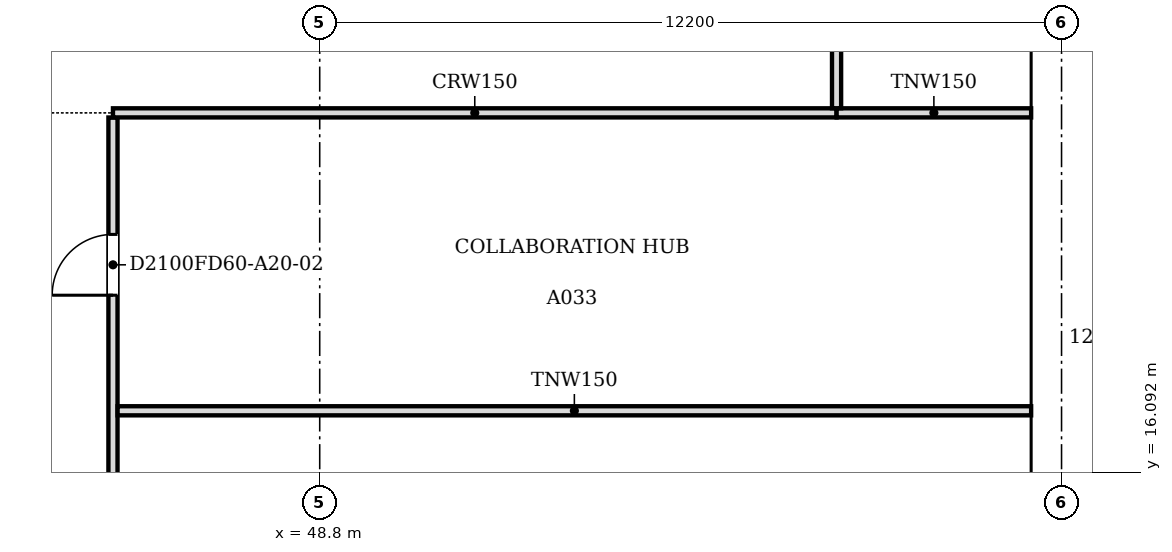
"""IFC4 building model, lengths in metres.
Left out: names, types, materials, properties, quantities, classifications, styles, units other than length and angle.
Written with IfcOpenShell. Run it as: python <this file> out.ifc"""

import sys

from ifc_helpers import new_model, si_unit, direction, frame, frame_2d, origin, place, context, subcontext, project, spatial, polyline, rectangle, outline, extrude, faceted_brep, source, transform, mapped, element, fill, save


model = new_model("IFC4")
c1 = context("Model", 3, precision=1e-05, world=origin(), true_north=direction((0.0, 1.0)))
c2 = subcontext(c1, "Body", "Model", "MODEL_VIEW")
j1 = project(units=[si_unit("LENGTHUNIT", "METRE"), si_unit("PLANEANGLEUNIT", "RADIAN")], contexts=[c1])
p1 = place(None, origin())
s1 = spatial("IfcSite", under=j1, at=p1, CompositionType="ELEMENT")
p2 = place(p1, origin())
s2 = spatial("IfcBuilding", under=s1, at=p2, CompositionType="ELEMENT")
p3 = place(p2, frame((0.0, 0.0, 228.3)))
s3 = spatial("IfcBuildingStorey", under=s2, at=p3, CompositionType="ELEMENT", Elevation=228.3)
m1 = source(origin(), c2, "Body", "SweptSolid", [
    extrude(outline(polyline([(3.05, 0.0), (6.1, 3.8), (3.05, 7.6), (0.0, 3.8), (3.05, 0.0)])), frame((0.0, 0.25, 0.0), z_axis=(0.0, -1.0, 0.0), x_axis=(1.0, 0.0, 0.0)), (0.0, 0.0, 1.0), 0.5),
])
p4 = place(p3, frame((60.75, 12.2, -3.8), z_axis=(0.0, 0.0, 1.0), x_axis=(0.0, 1.0, 0.0)))
e1 = element("IfcWall", 1, at=p4, inside=s3, PredefinedType="SOLIDWALL", context=c2, shape_type="MappedRepresentation", body=[
    mapped(m1, transform((0.0, 0.0, 0.0), scale=1.0)),
])
m2 = source(origin(), c2, "Body", "SweptSolid", [
    extrude(outline(polyline([(3.05, 0.399), (5.78, 3.8), (3.05, 7.201), (0.321, 3.8), (3.05, 0.399)])), frame((0.0, 0.26, 0.0), z_axis=(0.0, -1.0, 0.0), x_axis=(1.0, 0.0, 0.0)), (0.0, 0.0, 1.0), 0.52),
])
p5 = place(p4, origin())
e2 = element("IfcOpeningElement", 2, at=p5, cuts=e1, PredefinedType="OPENING", context=c2, shape_type="MappedRepresentation", body=[
    mapped(m2, transform((0.0, 0.0, 0.0), scale=1.0)),
])
m3 = source(origin(), c2, "Body", "Brep", [
    faceted_brep([(3.05, -0.25, 0.0), (6.1, -0.25, 3.8), (6.1, -0.25, 3.8), (3.05, -0.25, 7.6), (0.0, -0.25, 3.8), (0.0, 0.25, 3.8), (3.05, 0.25, 7.6), (6.1, 0.25, 3.8), (6.1, 0.25, 3.8), (3.05, 0.25, 0.0)], [[[0, 1, 2, 3, 4]], [[5, 6, 7, 8, 9]], [[9, 8, 1, 0]], [[7, 6, 3, 2]], [[6, 5, 4, 3]], [[5, 9, 0, 4]], [[1, 8, 7, 2]]]),
])
p6 = place(p3, frame((60.75, 18.3, -3.8), z_axis=(0.0, 0.0, 1.0), x_axis=(0.0, 1.0, 0.0)))
e3 = element("IfcWall", 3, at=p6, inside=s3, PredefinedType="SOLIDWALL", context=c2, shape_type="MappedRepresentation", body=[
    mapped(m3, transform((0.0, 0.0, 0.0), scale=1.0)),
])
p7 = place(p6, origin())
e4 = element("IfcOpeningElement", 4, at=p7, cuts=e3, PredefinedType="OPENING", context=c2, shape_type="MappedRepresentation", body=[
    mapped(m2, transform((0.0, 0.0, 0.0), scale=1.0)),
])
m4 = source(origin(), c2, "Body", "SweptSolid", [
    extrude(outline(polyline([(3.05, 0.0), (6.1, 3.8), (0.0, 3.8), (3.05, 0.0)])), frame((0.0, 0.25, 0.0), z_axis=(0.0, -1.0, 0.0), x_axis=(1.0, 0.0, 0.0)), (0.0, 0.0, 1.0), 0.5),
])
p8 = place(p3, frame((60.75, 15.25, 0.0), z_axis=(0.0, 0.0, 1.0), x_axis=(0.0, 1.0, 0.0)))
e5 = element("IfcWall", 5, at=p8, inside=s3, PredefinedType="SOLIDWALL", context=c2, shape_type="MappedRepresentation", body=[
    mapped(m4, transform((0.0, 0.0, 0.0), scale=1.0)),
])
m5 = source(origin(), c2, "Body", "SweptSolid", [
    extrude(outline(polyline([(3.05, 0.399), (5.579, 3.55), (0.521, 3.55), (3.05, 0.399)])), frame((0.0, 0.26, 0.0), z_axis=(0.0, -1.0, 0.0), x_axis=(1.0, 0.0, 0.0)), (0.0, 0.0, 1.0), 0.52),
])
p9 = place(p8, origin())
e6 = element("IfcOpeningElement", 6, at=p9, cuts=e5, PredefinedType="OPENING", context=c2, shape_type="MappedRepresentation", body=[
    mapped(m5, transform((0.0, 0.0, 0.0), scale=1.0)),
])
m6 = source(origin(), c2, "Body", "Brep", [
    faceted_brep([(3.05, -0.25, 0.0), (6.1, -0.25, 3.8), (6.1, -0.25, 3.8), (0.0, -0.25, 3.8), (0.0, 0.25, 3.8), (6.1, 0.25, 3.8), (6.1, 0.25, 3.8), (3.05, 0.25, 0.0)], [[[0, 1, 2, 3]], [[4, 5, 6, 7]], [[7, 6, 1, 0]], [[5, 4, 3, 2]], [[4, 7, 0, 3]], [[1, 6, 5, 2]]]),
])
p10 = place(p3, frame((60.75, 21.35, 0.0), z_axis=(0.0, 0.0, 1.0), x_axis=(0.0, 1.0, 0.0)))
e7 = element("IfcWall", 7, at=p10, inside=s3, PredefinedType="SOLIDWALL", context=c2, shape_type="MappedRepresentation", body=[
    mapped(m6, transform((0.0, 0.0, 0.0), scale=1.0)),
])
p11 = place(p10, origin())
e8 = element("IfcOpeningElement", 8, at=p11, cuts=e7, PredefinedType="OPENING", context=c2, shape_type="MappedRepresentation", body=[
    mapped(m5, transform((0.0, 0.0, 0.0), scale=1.0)),
])
p12 = place(p3, frame((45.4, 21.924, 0.0), z_axis=(0.0, 0.0, 1.0), x_axis=(0.0, -1.0, 0.0)))
e9 = element("IfcWall", 9, at=p12, inside=s3, PredefinedType="PARTITIONING", context=c2, shape_type="SweptSolid", body=[
    extrude(rectangle(XDim=17.724, YDim=0.15, at=frame_2d((8.862, 0.0))), origin(), (0.0, 0.0, 1.0), 2.888),
])
m7 = source(origin(), c2, "Body", "SweptSolid", [
    extrude(rectangle(XDim=1.0, YDim=2.1, at=frame_2d((0.5, 1.05))), frame((0.0, 0.085, 0.0), z_axis=(0.0, -1.0, 0.0), x_axis=(1.0, 0.0, 0.0)), (0.0, 0.0, 1.0), 0.17),
])
p13 = place(p12, frame((1.923, 0.0, 0.0)))
e10 = element("IfcOpeningElement", 10, at=p13, cuts=e9, PredefinedType="OPENING", context=c2, shape_type="MappedRepresentation", body=[
    mapped(m7, transform((0.0, 0.0, 0.0), scale=1.0)),
])
p14 = place(p12, frame((10.824, 0.0, 0.0)))
e11 = element("IfcOpeningElement", 11, at=p14, cuts=e9, PredefinedType="OPENING", context=c2, shape_type="MappedRepresentation", body=[
    mapped(m7, transform((0.0, 0.0, 0.0), scale=1.0)),
])
p15 = place(p3, frame((45.476, 17.1, 0.0), z_axis=(0.0, 0.0, 1.0), x_axis=(1.0, 0.0, 0.0)))
e12 = element("IfcWall", 12, at=p15, inside=s3, PredefinedType="PARTITIONING", context=c2, shape_type="SweptSolid", body=[
    extrude(rectangle(XDim=15.024, YDim=0.15, at=frame_2d((7.512, 0.0))), origin(), (0.0, 0.0, 1.0), 2.888),
])
p16 = place(p3, frame((45.4, 22.0, 0.0), z_axis=(0.0, 0.0, 1.0), x_axis=(1.0, 0.0, 0.0)))
e13 = element("IfcWall", 13, at=p16, inside=s3, PredefinedType="PARTITIONING", context=c2, shape_type="SweptSolid", body=[
    extrude(rectangle(XDim=11.9, YDim=0.15, at=frame_2d((5.95, 0.0))), origin(), (0.0, 0.0, 1.0), 2.888),
])
p17 = place(p3, frame((57.301, 22.0, 0.0), z_axis=(0.0, 0.0, 1.0), x_axis=(1.0, 0.0, 0.0)))
e14 = element("IfcWall", 14, at=p17, inside=s3, PredefinedType="PARTITIONING", context=c2, shape_type="SweptSolid", body=[
    extrude(rectangle(XDim=3.199, YDim=0.15, at=frame_2d((1.6, 0.0))), origin(), (0.0, 0.0, 1.0), 2.888),
])
p18 = place(p3, frame((57.3, 30.6, 0.0), z_axis=(0.0, 0.0, 1.0), x_axis=(0.0, -1.0, 0.0)))
e15 = element("IfcWall", 15, at=p18, inside=s3, PredefinedType="PARTITIONING", context=c2, shape_type="SweptSolid", body=[
    extrude(rectangle(XDim=8.524, YDim=0.15, at=frame_2d((4.262, 0.0))), origin(), (0.0, 0.0, 1.0), 2.888),
])
m8 = source(origin(), c2, "Body", "SweptSolid", [
    extrude(rectangle(XDim=0.9, YDim=2.1, at=frame_2d((0.45, 1.05))), frame((0.0, 0.085, 0.0), z_axis=(0.0, -1.0, 0.0), x_axis=(1.0, 0.0, 0.0)), (0.0, 0.0, 1.0), 0.17),
])
p19 = place(p18, frame((3.824, 0.0, 0.0)))
e16 = element("IfcOpeningElement", 16, at=p19, cuts=e15, PredefinedType="OPENING", context=c2, shape_type="MappedRepresentation", body=[
    mapped(m8, transform((0.0, 0.0, 0.0), scale=1.0)),
])
m9 = source(origin(), c2, "Body", "SweptSolid", [
    extrude(rectangle(XDim=1.0, YDim=2.1, at=frame_2d((0.5, 1.05))), frame((0.0, 0.025, 0.0), z_axis=(0.0, -1.0, 0.0), x_axis=(1.0, 0.0, 0.0)), (0.0, 0.0, 1.0), 0.05),
])
p20 = place(p13, origin())
e17 = element("IfcDoor", 17, at=p20, inside=s3, OperationType="SINGLE_SWING_RIGHT", PredefinedType="DOOR", context=c2, shape_type="MappedRepresentation", body=[
    mapped(m9, transform((0.0, 0.0, 0.0), scale=1.0)),
])
fill(e10, e17)
save(model, sys.argv[1])
